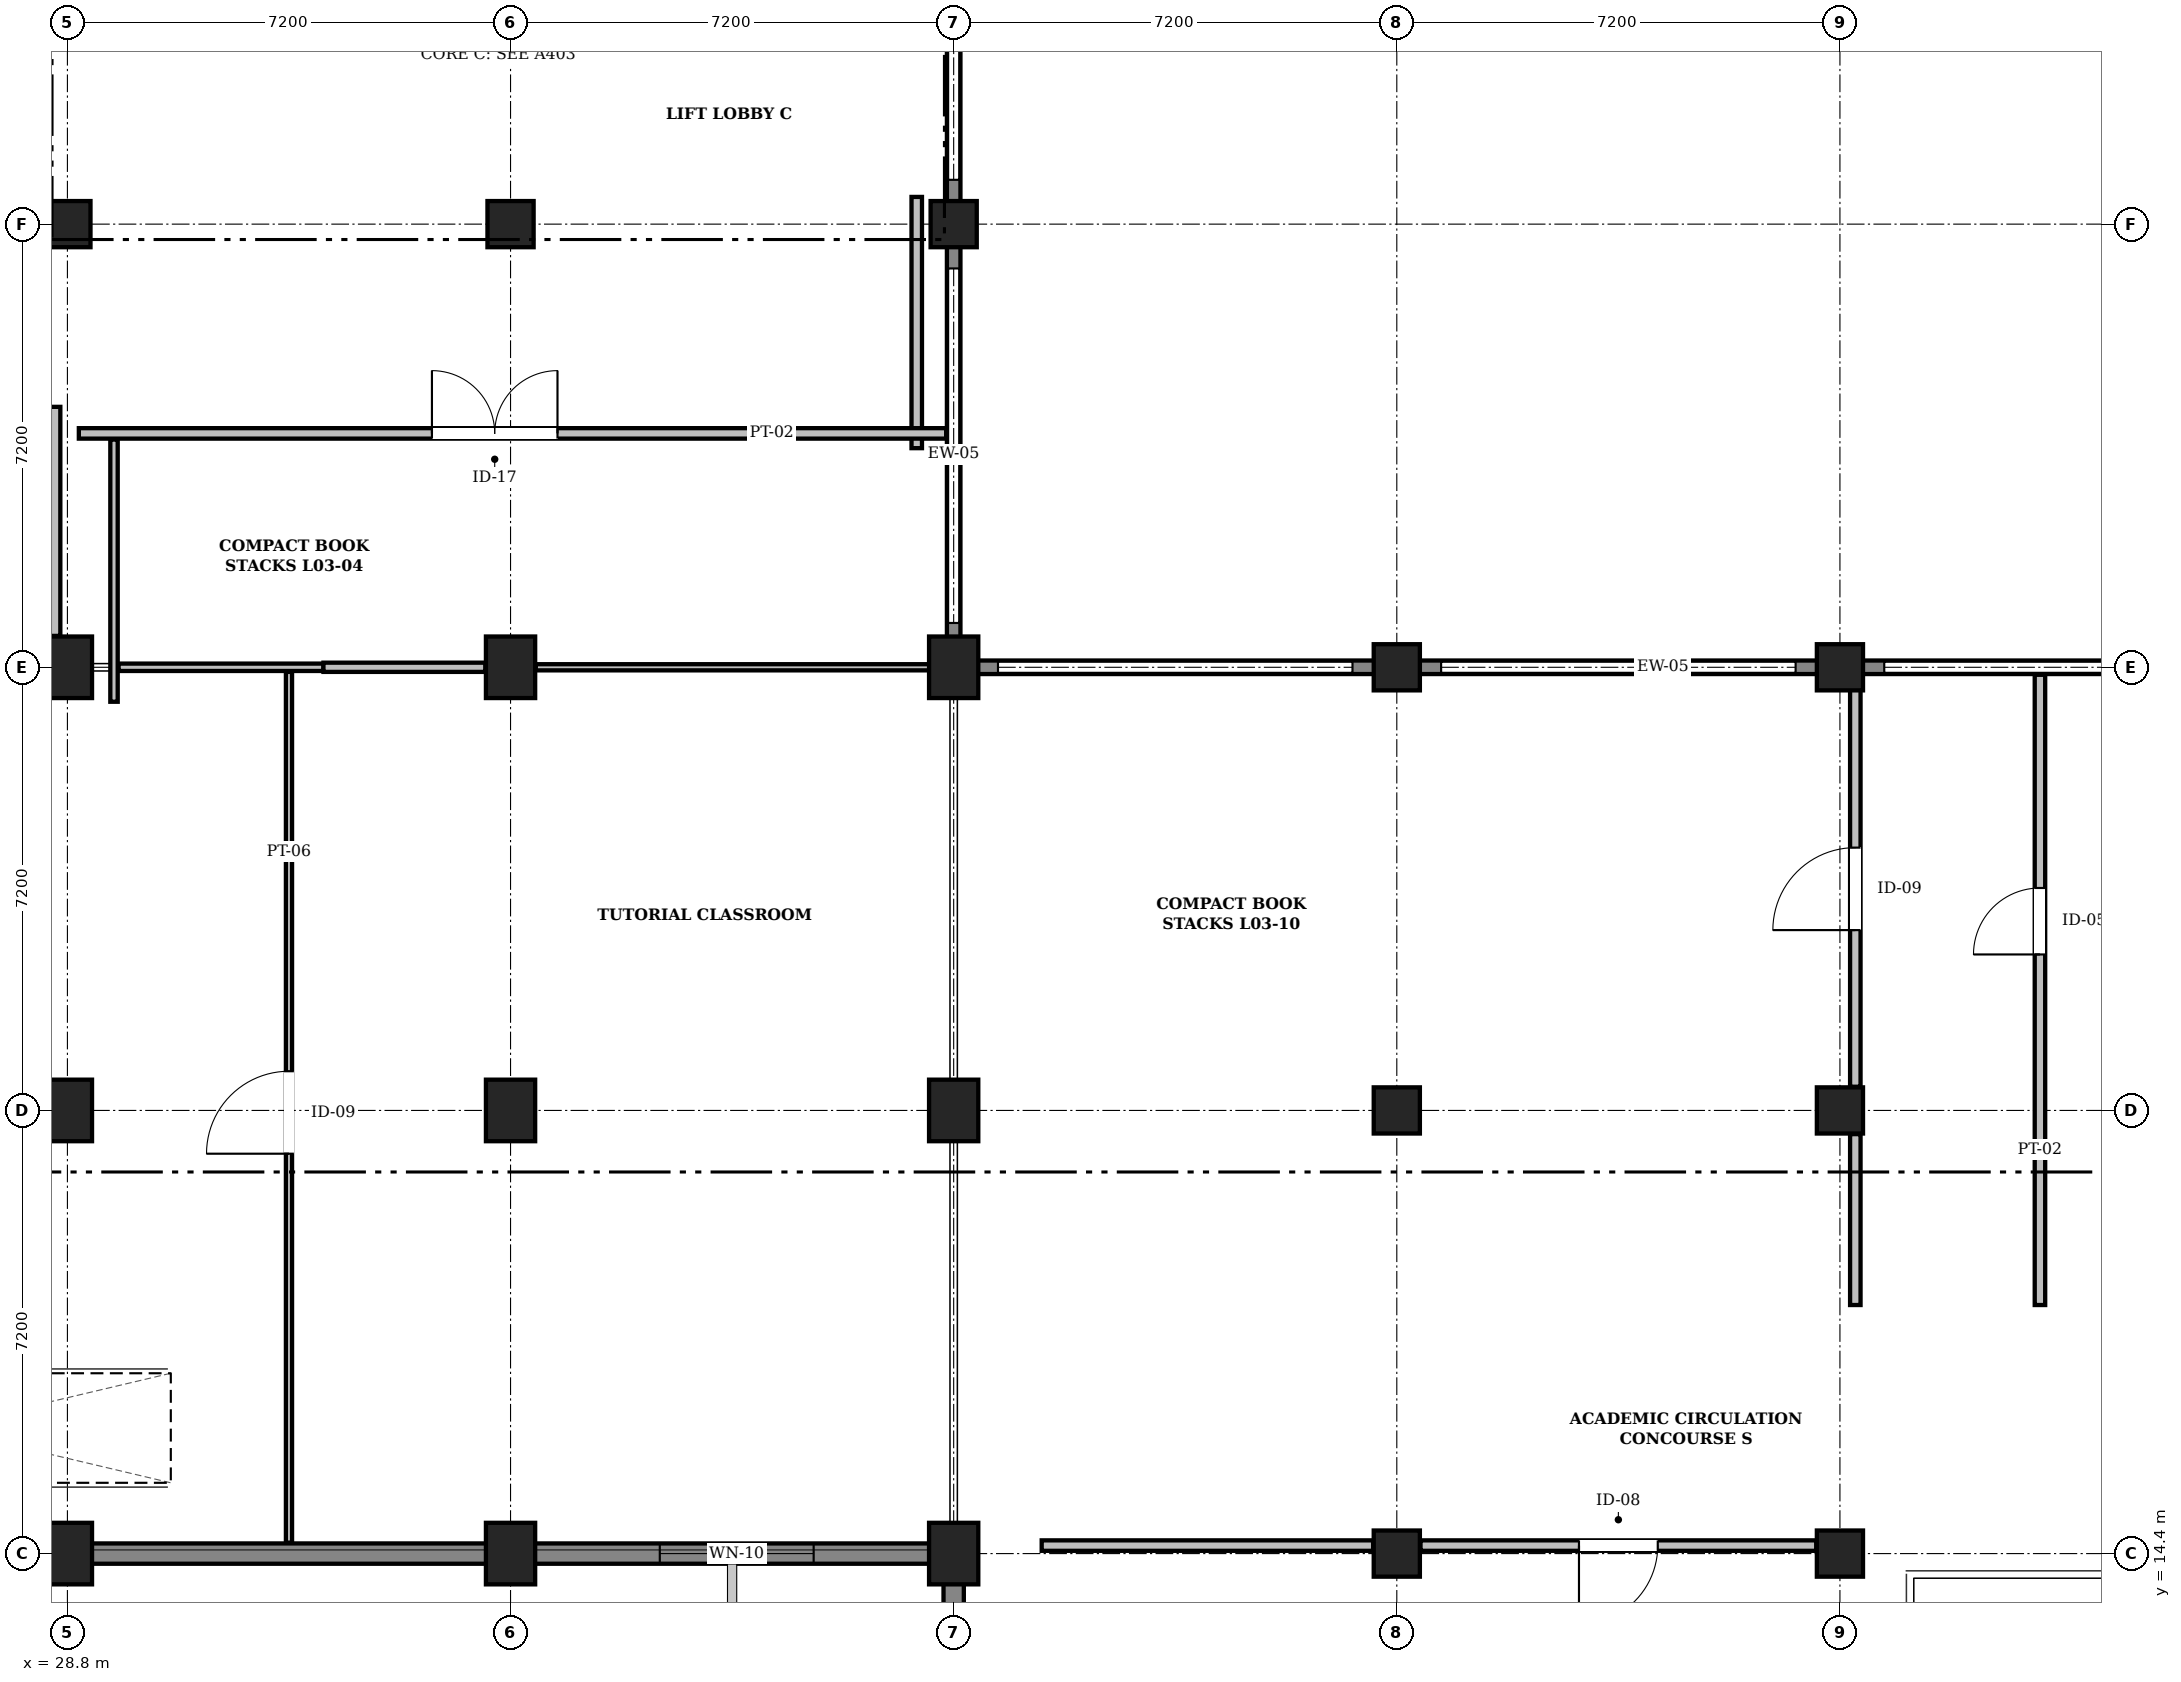
"""IFC4 building model, lengths in metres.
Left out: names, types, materials, properties, quantities, classifications, styles, units other than length and angle.
Written with IfcOpenShell. Run it as: python <this file> out.ifc"""

import sys

from ifc_helpers import new_model, si_unit, direction, frame, frame_2d, origin, origin_2d, place, context, subcontext, project, spatial, rectangle, extrude, element, fill, save


model = new_model("IFC4")
c1 = context("Model", 3, precision=1e-05, world=origin(), true_north=direction((0.0, 1.0)))
c2 = subcontext(c1, "Body", "Model", "MODEL_VIEW")
j1 = project(units=[si_unit("LENGTHUNIT", "METRE"), si_unit("PLANEANGLEUNIT", "RADIAN")], contexts=[c1])
p1 = place(None, origin())
s1 = spatial("IfcSite", under=j1, at=p1, CompositionType="ELEMENT")
p2 = place(p1, origin())
s2 = spatial("IfcBuilding", under=s1, at=p2, CompositionType="ELEMENT")
p3 = place(p2, frame((0.0, 0.0, 14.4)))
s3 = spatial("IfcBuildingStorey", under=s2, at=p3, CompositionType="ELEMENT", Elevation=14.4)
for number, where, z_axis, x_axis in (
    (1, (28.8, 14.4, 0.0), (0.0, 0.0, 1.0), (1.0, 0.0, 0.0)),
    (2, (28.8, 21.6, 0.0), (0.0, 0.0, 1.0), (1.0, 0.0, 0.0)),
    (3, (28.8, 28.8, 0.0), (0.0, 0.0, 1.0), (1.0, 0.0, 0.0)),
):
    element("IfcColumn", number, at=place(p3, frame(where, z_axis=z_axis, x_axis=x_axis)), inside=s3, PredefinedType="COLUMN", context=c2, shape_type="SweptSolid", body=[
        extrude(rectangle(XDim=0.8, YDim=1.0, at=origin_2d()), origin(), (0.0, 0.0, 1.0), 4.5),
    ])
p4 = place(p3, frame((28.8, 36.0, 0.0), z_axis=(0.0, 0.0, 1.0), x_axis=(1.0, 0.0, 0.0)))
e4 = element("IfcColumn", 4, at=p4, inside=s3, PredefinedType="COLUMN", context=c2, shape_type="SweptSolid", body=[
    extrude(rectangle(XDim=0.75, YDim=0.75, at=origin_2d()), origin(), (0.0, 0.0, 1.0), 4.5),
])
for number, where, z_axis, x_axis in (
    (5, (36.0, 14.4, 0.0), (0.0, 0.0, 1.0), (1.0, 0.0, 0.0)),
    (6, (36.0, 21.6, 0.0), (0.0, 0.0, 1.0), (1.0, 0.0, 0.0)),
    (7, (36.0, 28.8, 0.0), (0.0, 0.0, 1.0), (1.0, 0.0, 0.0)),
):
    element("IfcColumn", number, at=place(p3, frame(where, z_axis=z_axis, x_axis=x_axis)), inside=s3, PredefinedType="COLUMN", context=c2, shape_type="SweptSolid", body=[
        extrude(rectangle(XDim=0.8, YDim=1.0, at=origin_2d()), origin(), (0.0, 0.0, 1.0), 4.5),
    ])
p5 = place(p3, frame((36.0, 36.0, 0.0), z_axis=(0.0, 0.0, 1.0), x_axis=(1.0, 0.0, 0.0)))
e8 = element("IfcColumn", 8, at=p5, inside=s3, PredefinedType="COLUMN", context=c2, shape_type="SweptSolid", body=[
    extrude(rectangle(XDim=0.75, YDim=0.75, at=origin_2d()), origin(), (0.0, 0.0, 1.0), 4.5),
])
for number, where, z_axis, x_axis in (
    (9, (43.2, 14.4, 0.0), (0.0, 0.0, 1.0), (1.0, 0.0, 0.0)),
    (10, (43.2, 21.6, 0.0), (0.0, 0.0, 1.0), (1.0, 0.0, 0.0)),
    (11, (43.2, 28.8, 0.0), (0.0, 0.0, 1.0), (1.0, 0.0, 0.0)),
):
    element("IfcColumn", number, at=place(p3, frame(where, z_axis=z_axis, x_axis=x_axis)), inside=s3, PredefinedType="COLUMN", context=c2, shape_type="SweptSolid", body=[
        extrude(rectangle(XDim=0.8, YDim=1.0, at=origin_2d()), origin(), (0.0, 0.0, 1.0), 4.5),
    ])
for number, where, z_axis, x_axis in (
    (12, (43.2, 36.0, 0.0), (0.0, 0.0, 1.0), (1.0, 0.0, 0.0)),
    (13, (50.4, 14.4, 0.0), (0.0, 0.0, 1.0), (1.0, 0.0, 0.0)),
    (14, (50.4, 21.6, 0.0), (0.0, 0.0, 1.0), (1.0, 0.0, 0.0)),
    (15, (50.4, 28.8, 0.0), (0.0, 0.0, 1.0), (1.0, 0.0, 0.0)),
    (16, (57.6, 14.4, 0.0), (0.0, 0.0, 1.0), (1.0, 0.0, 0.0)),
    (17, (57.6, 21.6, 0.0), (0.0, 0.0, 1.0), (1.0, 0.0, 0.0)),
    (18, (57.6, 28.8, 0.0), (0.0, 0.0, 1.0), (1.0, 0.0, 0.0)),
):
    element("IfcColumn", number, at=place(p3, frame(where, z_axis=z_axis, x_axis=x_axis)), inside=s3, PredefinedType="COLUMN", context=c2, shape_type="SweptSolid", body=[
        extrude(rectangle(XDim=0.75, YDim=0.75, at=origin_2d()), origin(), (0.0, 0.0, 1.0), 4.5),
    ])
p6 = place(p3, frame((43.2, 7.2, 0.0), z_axis=(0.0, 0.0, 1.0), x_axis=(0.0, 1.0, 0.0)))
e19 = element("IfcWall", 19, at=p6, inside=s3, PredefinedType="SOLIDWALL", context=c2, shape_type="SweptSolid", body=[
    extrude(rectangle(XDim=7.034, YDim=0.33, at=frame_2d((3.517, 0.0))), origin(), (0.0, 0.0, 1.0), 4.22),
])
p7 = place(p3, frame((43.35, 14.4, 0.0), z_axis=(0.0, 0.0, 1.0), x_axis=(-1.0, 0.0, 0.0)))
e20 = element("IfcWall", 20, at=p7, inside=s3, PredefinedType="SOLIDWALL", context=c2, shape_type="SweptSolid", body=[
    extrude(rectangle(XDim=7.35, YDim=0.33, at=frame_2d((3.675, 0.0))), origin(), (0.0, 0.0, 1.0), 4.22),
])
p8 = place(p7, frame((2.425, 0.0, 0.95)))
e21 = element("IfcOpeningElement", 21, at=p8, cuts=e20, PredefinedType="OPENING", context=c2, shape_type="SweptSolid", body=[
    extrude(rectangle(XDim=2.5, YDim=1.3, at=frame_2d((1.25, 0.65))), frame((0.0, 0.177, 0.0), z_axis=(0.0, -1.0, 0.0), x_axis=(1.0, 0.0, 0.0)), (0.0, 0.0, 1.0), 0.354),
])
p9 = place(p3, frame((36.0, 14.4, 0.0), z_axis=(0.0, 0.0, 1.0), x_axis=(-1.0, 0.0, 0.0)))
e22 = element("IfcWall", 22, at=p9, inside=s3, PredefinedType="SOLIDWALL", context=c2, shape_type="SweptSolid", body=[
    extrude(rectangle(XDim=7.2, YDim=0.33, at=frame_2d((3.6, 0.0))), origin(), (0.0, 0.0, 1.0), 4.22),
])
p10 = place(p3, frame((28.8, 14.4, 0.0), z_axis=(0.0, 0.0, 1.0), x_axis=(-1.0, 0.0, 0.0)))
e23 = element("IfcWall", 23, at=p10, inside=s3, PredefinedType="SOLIDWALL", context=c2, shape_type="SweptSolid", body=[
    extrude(rectangle(XDim=7.2, YDim=0.33, at=frame_2d((3.6, 0.0))), origin(), (0.0, 0.0, 1.0), 4.22),
])
p11 = place(p10, frame((1.36, 0.0, 0.95)))
e24 = element("IfcOpeningElement", 24, at=p11, cuts=e23, PredefinedType="OPENING", context=c2, shape_type="SweptSolid", body=[
    extrude(rectangle(XDim=2.7, YDim=1.3, at=frame_2d((1.35, 0.65))), frame((0.0, 0.177, 0.0), z_axis=(0.0, -1.0, 0.0), x_axis=(1.0, 0.0, 0.0)), (0.0, 0.0, 1.0), 0.354),
])
p12 = place(p3, frame((43.2, 43.2, 0.0), z_axis=(0.0, 0.0, 1.0), x_axis=(0.0, -1.0, 0.0)))
e25 = element("IfcWall", 25, at=p12, inside=s3, PredefinedType="SOLIDWALL", context=c2, shape_type="SweptSolid", body=[
    extrude(rectangle(XDim=7.2, YDim=0.22, at=frame_2d((3.6, 0.0))), origin(), (0.0, 0.0, 1.0), 1.24),
])
p13 = place(p3, frame((43.2, 36.0, 0.0), z_axis=(0.0, 0.0, 1.0), x_axis=(0.0, -1.0, 0.0)))
e26 = element("IfcWall", 26, at=p13, inside=s3, PredefinedType="SOLIDWALL", context=c2, shape_type="SweptSolid", body=[
    extrude(rectangle(XDim=7.034, YDim=0.22, at=frame_2d((3.517, 0.0))), origin(), (0.0, 0.0, 1.0), 1.24),
])
p14 = place(p3, frame((43.05, 28.8, 0.0), z_axis=(0.0, 0.0, 1.0), x_axis=(1.0, 0.0, 0.0)))
e27 = element("IfcWall", 27, at=p14, inside=s3, PredefinedType="SOLIDWALL", context=c2, shape_type="SweptSolid", body=[
    extrude(rectangle(XDim=7.35, YDim=0.22, at=frame_2d((3.675, 0.0))), origin(), (0.0, 0.0, 1.0), 1.24),
])
p15 = place(p3, frame((50.4, 28.8, 0.0), z_axis=(0.0, 0.0, 1.0), x_axis=(1.0, 0.0, 0.0)))
e28 = element("IfcWall", 28, at=p15, inside=s3, PredefinedType="SOLIDWALL", context=c2, shape_type="SweptSolid", body=[
    extrude(rectangle(XDim=7.2, YDim=0.22, at=frame_2d((3.6, 0.0))), origin(), (0.0, 0.0, 1.0), 1.24),
])
p16 = place(p3, frame((57.6, 28.8, 0.0), z_axis=(0.0, 0.0, 1.0), x_axis=(1.0, 0.0, 0.0)))
e29 = element("IfcWall", 29, at=p16, inside=s3, PredefinedType="SOLIDWALL", context=c2, shape_type="SweptSolid", body=[
    extrude(rectangle(XDim=7.2, YDim=0.22, at=frame_2d((3.6, 0.0))), origin(), (0.0, 0.0, 1.0), 1.24),
])
p17 = place(p3, frame((50.785, 14.53, 0.0), z_axis=(0.0, 0.0, 1.0), x_axis=(1.0, 0.0, 0.0)))
e30 = element("IfcWall", 30, at=p17, inside=s3, PredefinedType="PARTITIONING", context=c2, shape_type="SweptSolid", body=[
    extrude(rectangle(XDim=6.43, YDim=0.17, at=frame_2d((3.215, 0.0))), origin(), (0.0, 0.0, 1.0), 3.7),
])
p18 = place(p17, frame((2.575, 0.0, 0.0)))
e31 = element("IfcOpeningElement", 31, at=p18, cuts=e30, PredefinedType="OPENING", context=c2, shape_type="SweptSolid", body=[
    extrude(rectangle(XDim=1.28, YDim=2.22, at=frame_2d((0.64, 1.11))), frame((0.0, 0.097, 0.0), z_axis=(0.0, -1.0, 0.0), x_axis=(1.0, 0.0, 0.0)), (0.0, 0.0, 1.0), 0.194),
])
p19 = place(p3, frame((44.63, 14.53, 0.0), z_axis=(0.0, 0.0, 1.0), x_axis=(1.0, 0.0, 0.0)))
e32 = element("IfcWall", 32, at=p19, inside=s3, PredefinedType="PARTITIONING", context=c2, shape_type="SweptSolid", body=[
    extrude(rectangle(XDim=5.385, YDim=0.17, at=frame_2d((2.692, 0.0))), origin(), (0.0, 0.0, 1.0), 3.7),
])
p20 = place(p3, frame((57.85, 21.985, 0.0), z_axis=(0.0, 0.0, 1.0), x_axis=(0.0, 1.0, 0.0)))
e33 = element("IfcWall", 33, at=p20, inside=s3, PredefinedType="PARTITIONING", context=c2, shape_type="SweptSolid", body=[
    extrude(rectangle(XDim=6.693, YDim=0.17, at=frame_2d((3.346, 0.0))), origin(), (0.0, 0.0, 1.0), 3.73),
])
p21 = place(p20, frame((2.545, 0.0, 0.0)))
e34 = element("IfcOpeningElement", 34, at=p21, cuts=e33, PredefinedType="OPENING", context=c2, shape_type="SweptSolid", body=[
    extrude(rectangle(XDim=1.34, YDim=2.24, at=frame_2d((0.67, 1.12))), frame((0.0, 0.097, 0.0), z_axis=(0.0, -1.0, 0.0), x_axis=(1.0, 0.0, 0.0)), (0.0, 0.0, 1.0), 0.194),
])
p22 = place(p3, frame((57.85, 18.438, 0.0), z_axis=(0.0, 0.0, 1.0), x_axis=(0.0, 1.0, 0.0)))
e35 = element("IfcWall", 35, at=p22, inside=s3, PredefinedType="PARTITIONING", context=c2, shape_type="SweptSolid", body=[
    extrude(rectangle(XDim=2.777, YDim=0.17, at=frame_2d((1.388, 0.0))), origin(), (0.0, 0.0, 1.0), 3.73),
])
p23 = place(p3, frame((60.85, 18.438, 0.0), z_axis=(0.0, 0.0, 1.0), x_axis=(0.0, 1.0, 0.0)))
e36 = element("IfcWall", 36, at=p23, inside=s3, PredefinedType="PARTITIONING", context=c2, shape_type="SweptSolid", body=[
    extrude(rectangle(XDim=10.24, YDim=0.17, at=frame_2d((5.12, 0.0))), origin(), (0.0, 0.0, 1.0), 4.16),
])
p24 = place(p23, frame((5.696, 0.0, 0.0)))
e37 = element("IfcOpeningElement", 37, at=p24, cuts=e36, PredefinedType="OPENING", context=c2, shape_type="SweptSolid", body=[
    extrude(rectangle(XDim=1.08, YDim=2.2, at=frame_2d((0.54, 1.1))), frame((0.0, 0.097, 0.0), z_axis=(0.0, -1.0, 0.0), x_axis=(1.0, 0.0, 0.0)), (0.0, 0.0, 1.0), 0.194),
])
p25 = place(p3, frame((28.6, 29.31, 0.0), z_axis=(0.0, 0.0, 1.0), x_axis=(0.0, 1.0, 0.0)))
e38 = element("IfcWall", 38, at=p25, inside=s3, PredefinedType="PARTITIONING", context=c2, shape_type="SweptSolid", body=[
    extrude(rectangle(XDim=3.721, YDim=0.17, at=frame_2d((1.861, 0.0))), origin(), (0.0, 0.0, 1.0), 3.73),
])
p26 = place(p3, frame((42.6, 32.36, 0.0), z_axis=(0.0, 0.0, 1.0), x_axis=(0.0, 1.0, 0.0)))
e39 = element("IfcWall", 39, at=p26, inside=s3, PredefinedType="PARTITIONING", context=c2, shape_type="SweptSolid", body=[
    extrude(rectangle(XDim=4.082, YDim=0.17, at=frame_2d((2.041, 0.0))), origin(), (0.0, 0.0, 1.0), 4.16),
])
p27 = place(p3, frame((28.986, 32.6, 0.0), z_axis=(0.0, 0.0, 1.0), x_axis=(1.0, 0.0, 0.0)))
e40 = element("IfcWall", 40, at=p27, inside=s3, PredefinedType="PARTITIONING", context=c2, shape_type="SweptSolid", body=[
    extrude(rectangle(XDim=14.092, YDim=0.17, at=frame_2d((7.046, 0.0))), origin(), (0.0, 0.0, 1.0), 4.16),
])
p28 = place(p27, frame((5.737, 0.0, 0.0)))
e41 = element("IfcOpeningElement", 41, at=p28, cuts=e40, PredefinedType="OPENING", context=c2, shape_type="SweptSolid", body=[
    extrude(rectangle(XDim=2.04, YDim=2.34, at=frame_2d((1.02, 1.17))), frame((0.0, 0.097, 0.0), z_axis=(0.0, -1.0, 0.0), x_axis=(1.0, 0.0, 0.0)), (0.0, 0.0, 1.0), 0.194),
])
p29 = place(p3, frame((29.557, 28.24, 0.0), z_axis=(0.0, 0.0, 1.0), x_axis=(0.0, 1.0, 0.0)))
e42 = element("IfcWall", 42, at=p29, inside=s3, PredefinedType="PARTITIONING", context=c2, shape_type="SweptSolid", body=[
    extrude(rectangle(XDim=4.26, YDim=0.12, at=frame_2d((2.13, 0.0))), origin(), (0.0, 0.0, 1.0), 4.16),
])
p30 = place(p3, frame((29.632, 28.8, 0.0), z_axis=(0.0, 0.0, 1.0), x_axis=(1.0, 0.0, 0.0)))
e43 = element("IfcWall", 43, at=p30, inside=s3, PredefinedType="PARTITIONING", context=c2, shape_type="SweptSolid", body=[
    extrude(rectangle(XDim=3.328, YDim=0.12, at=frame_2d((1.664, 0.0))), origin(), (0.0, 0.0, 1.0), 3.7),
])
p31 = place(p3, frame((36.41, 28.8, 0.0), z_axis=(0.0, 0.0, 1.0), x_axis=(1.0, 0.0, 0.0)))
e44 = element("IfcWall", 44, at=p31, inside=s3, PredefinedType="PARTITIONING", context=c2, shape_type="SweptSolid", body=[
    extrude(rectangle(XDim=6.628, YDim=0.1, at=frame_2d((3.314, 0.0))), origin(), (0.0, 0.0, 1.0), 3.7),
])
p32 = place(p3, frame((32.96, 28.8, 0.0), z_axis=(0.0, 0.0, 1.0), x_axis=(1.0, 0.0, 0.0)))
e45 = element("IfcWall", 45, at=p32, inside=s3, PredefinedType="PARTITIONING", context=c2, shape_type="SweptSolid", body=[
    extrude(rectangle(XDim=2.63, YDim=0.15, at=frame_2d((1.315, 0.0))), origin(), (0.0, 0.0, 1.0), 3.7),
])
p33 = place(p3, frame((32.4, 14.577, 0.0), z_axis=(0.0, 0.0, 1.0), x_axis=(0.0, 1.0, 0.0)))
e46 = element("IfcWall", 46, at=p33, inside=s3, PredefinedType="PARTITIONING", context=c2, shape_type="SweptSolid", body=[
    extrude(rectangle(XDim=14.148, YDim=0.1, at=frame_2d((7.074, 0.0))), origin(), (0.0, 0.0, 1.0), 4.16),
])
p34 = place(p33, frame((6.32, 0.0, 0.0)))
e47 = element("IfcOpeningElement", 47, at=p34, cuts=e46, PredefinedType="OPENING", context=c2, shape_type="SweptSolid", body=[
    extrude(rectangle(XDim=1.34, YDim=2.24, at=frame_2d((0.67, 1.12))), frame((0.0, 0.062, 0.0), z_axis=(0.0, -1.0, 0.0), x_axis=(1.0, 0.0, 0.0)), (0.0, 0.0, 1.0), 0.124),
])
p35 = place(p8, origin())
e48 = element("IfcWindow", 48, at=p35, inside=s3, PartitioningType="SINGLE_PANEL", PredefinedType="WINDOW", context=c2, shape_type="SweptSolid", body=[
    extrude(rectangle(XDim=2.5, YDim=1.3, at=frame_2d((1.25, 0.65))), frame((0.0, 0.03, 0.0), z_axis=(0.0, -1.0, 0.0), x_axis=(1.0, 0.0, 0.0)), (0.0, 0.0, 1.0), 0.06),
])
fill(e21, e48)
p36 = place(p18, frame((1.28, 0.0, 0.0), z_axis=(0.0, 0.0, 1.0), x_axis=(-1.0, 0.0, 0.0)))
e49 = element("IfcDoor", 49, at=p36, inside=s3, OperationType="SINGLE_SWING_RIGHT", PredefinedType="DOOR", context=c2, shape_type="SweptSolid", body=[
    extrude(rectangle(XDim=1.28, YDim=2.22, at=frame_2d((0.64, 1.11))), frame((0.0, 0.025, 0.0), z_axis=(0.0, -1.0, 0.0), x_axis=(1.0, 0.0, 0.0)), (0.0, 0.0, 1.0), 0.05),
])
fill(e31, e49)
p37 = place(p21, origin())
e50 = element("IfcDoor", 50, at=p37, inside=s3, OperationType="SINGLE_SWING_LEFT", PredefinedType="DOOR", context=c2, shape_type="SweptSolid", body=[
    extrude(rectangle(XDim=1.34, YDim=2.24, at=frame_2d((0.67, 1.12))), frame((0.0, 0.025, 0.0), z_axis=(0.0, -1.0, 0.0), x_axis=(1.0, 0.0, 0.0)), (0.0, 0.0, 1.0), 0.05),
])
fill(e34, e50)
p38 = place(p28, origin())
e51 = element("IfcDoor", 51, at=p38, inside=s3, OperationType="DOUBLE_DOOR_SINGLE_SWING", PredefinedType="DOOR", context=c2, shape_type="SweptSolid", body=[
    extrude(rectangle(XDim=2.04, YDim=2.34, at=frame_2d((1.02, 1.17))), frame((0.0, 0.025, 0.0), z_axis=(0.0, -1.0, 0.0), x_axis=(1.0, 0.0, 0.0)), (0.0, 0.0, 1.0), 0.05),
])
fill(e41, e51)
p39 = place(p24, origin())
e52 = element("IfcDoor", 52, at=p39, inside=s3, OperationType="SINGLE_SWING_LEFT", PredefinedType="DOOR", context=c2, shape_type="SweptSolid", body=[
    extrude(rectangle(XDim=1.08, YDim=2.2, at=frame_2d((0.54, 1.1))), frame((0.0, 0.025, 0.0), z_axis=(0.0, -1.0, 0.0), x_axis=(1.0, 0.0, 0.0)), (0.0, 0.0, 1.0), 0.05),
])
fill(e37, e52)
p40 = place(p34, origin())
e53 = element("IfcDoor", 53, at=p40, inside=s3, OperationType="SINGLE_SWING_LEFT", PredefinedType="DOOR", context=c2, shape_type="SweptSolid", body=[
    extrude(rectangle(XDim=1.34, YDim=2.24, at=frame_2d((0.67, 1.12))), frame((0.0, 0.025, 0.0), z_axis=(0.0, -1.0, 0.0), x_axis=(1.0, 0.0, 0.0)), (0.0, 0.0, 1.0), 0.05),
])
fill(e47, e53)
save(model, sys.argv[1])
